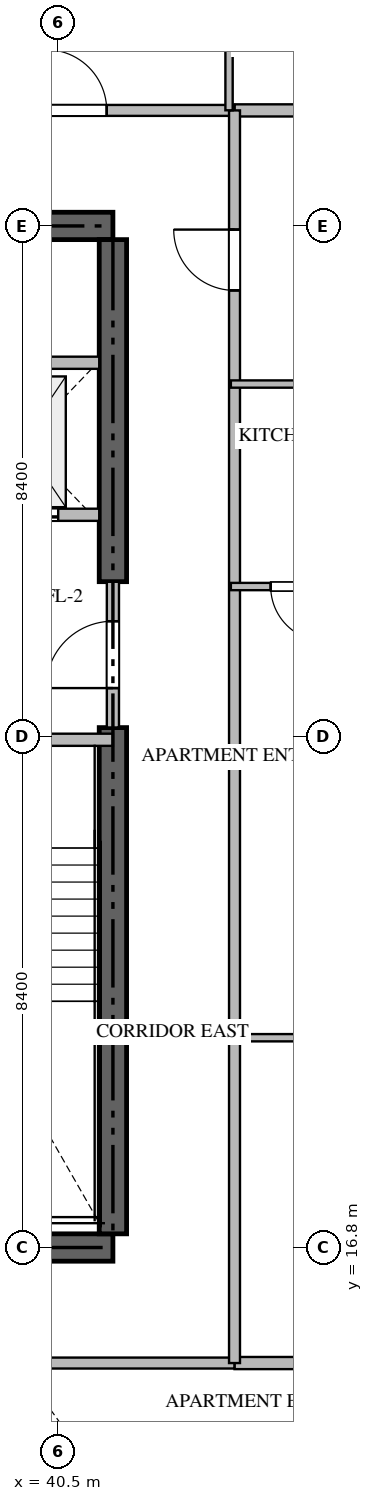
"""IFC4 building model, lengths in metres.
Left out: names, types, materials, properties, quantities, classifications, styles, units other than length and angle.
Written with IfcOpenShell. Run it as: python <this file> out.ifc"""

import sys

from ifc_helpers import new_model, si_unit, direction, frame, frame_2d, origin, place, context, subcontext, project, spatial, rectangle, extrude, source, transform, mapped, element, fill, save


model = new_model("IFC4")
c1 = context("Model", 3, precision=1e-05, world=origin(), true_north=direction((0.0, 1.0)))
c2 = subcontext(c1, "Body", "Model", "MODEL_VIEW")
j1 = project(units=[si_unit("LENGTHUNIT", "METRE"), si_unit("PLANEANGLEUNIT", "RADIAN")], contexts=[c1])
p1 = place(None, origin())
s1 = spatial("IfcSite", under=j1, at=p1, CompositionType="ELEMENT")
p2 = place(p1, origin())
s2 = spatial("IfcBuilding", under=s1, at=p2, CompositionType="ELEMENT")
p3 = place(p2, frame((0.0, 0.0, 49.2)))
s3 = spatial("IfcBuildingStorey", under=s2, at=p3, CompositionType="ELEMENT", Elevation=49.2)
for number, where, z_axis, x_axis in (
    (1, (23.4, 16.8, -0.26), (0.0, 0.0, 1.0), (1.0, 0.0, 0.0)),
    (2, (41.4, 33.6, -0.26), (0.0, 0.0, 1.0), (-1.0, 0.0, 0.0)),
):
    element("IfcWall", number, at=place(p3, frame(where, z_axis=z_axis, x_axis=x_axis)), inside=s3, PredefinedType="SHEAR", context=c2, shape_type="SweptSolid", body=[
        extrude(rectangle(XDim=18.0, YDim=0.45, at=frame_2d((9.0, 0.0))), origin(), (0.0, 0.0, 1.0), 3.748),
    ])
p4 = place(p3, frame((41.4, 17.025, -0.26), z_axis=(0.0, 0.0, 1.0), x_axis=(0.0, 1.0, 0.0)))
e3 = element("IfcWall", 3, at=p4, inside=s3, PredefinedType="SHEAR", context=c2, shape_type="SweptSolid", body=[
    extrude(rectangle(XDim=8.325, YDim=0.45, at=frame_2d((4.163, 0.0))), origin(), (0.0, 0.0, 1.0), 3.748),
])
p5 = place(p3, frame((41.4, 27.75, -0.26), z_axis=(0.0, 0.0, 1.0), x_axis=(0.0, 1.0, 0.0)))
e4 = element("IfcWall", 4, at=p5, inside=s3, PredefinedType="SHEAR", context=c2, shape_type="SweptSolid", body=[
    extrude(rectangle(XDim=5.625, YDim=0.45, at=frame_2d((2.812, 0.0))), origin(), (0.0, 0.0, 1.0), 3.748),
])
p6 = place(p3, frame((36.95, 25.15, 0.0), z_axis=(0.0, 0.0, 1.0), x_axis=(1.0, 0.0, 0.0)))
e5 = element("IfcWall", 5, at=p6, inside=s3, PredefinedType="STANDARD", context=c2, shape_type="SweptSolid", body=[
    extrude(rectangle(XDim=4.45, YDim=0.2, at=frame_2d((2.225, 0.0))), origin(), (0.0, 0.0, 1.0), 3.49),
])
p7 = place(p6, frame((1.65, 0.0, 0.0)))
e6 = element("IfcOpeningElement", 6, at=p7, cuts=e5, PredefinedType="OPENING", context=c2, shape_type="SweptSolid", body=[
    extrude(rectangle(XDim=1.1, YDim=2.15, at=frame_2d((0.55, 1.075))), frame((0.0, 0.11, 0.0), z_axis=(0.0, -1.0, 0.0), x_axis=(1.0, 0.0, 0.0)), (0.0, 0.0, 1.0), 0.22),
])
p8 = place(p3, frame((38.75, 28.85, 0.0), z_axis=(0.0, 0.0, 1.0), x_axis=(1.0, 0.0, 0.0)))
e7 = element("IfcWall", 7, at=p8, inside=s3, PredefinedType="STANDARD", context=c2, shape_type="SweptSolid", body=[
    extrude(rectangle(XDim=2.425, YDim=0.2, at=frame_2d((1.212, 0.0))), origin(), (0.0, 0.0, 1.0), 3.49),
])
p9 = place(p8, frame((0.55, 0.0, 0.0)))
e8 = element("IfcOpeningElement", 8, at=p9, cuts=e7, PredefinedType="OPENING", context=c2, shape_type="SweptSolid", body=[
    extrude(rectangle(XDim=1.2, YDim=2.2, at=frame_2d((0.6, 1.1))), frame((0.0, 0.11, 0.0), z_axis=(0.0, -1.0, 0.0), x_axis=(1.0, 0.0, 0.0)), (0.0, 0.0, 1.0), 0.22),
])
p10 = place(p3, frame((38.75, 31.35, 0.0), z_axis=(0.0, 0.0, 1.0), x_axis=(1.0, 0.0, 0.0)))
e9 = element("IfcWall", 9, at=p10, inside=s3, PredefinedType="STANDARD", context=c2, shape_type="SweptSolid", body=[
    extrude(rectangle(XDim=2.425, YDim=0.2, at=frame_2d((1.212, 0.0))), origin(), (0.0, 0.0, 1.0), 3.49),
])
p11 = place(p3, frame((41.4, 25.352, 0.0), z_axis=(0.0, 0.0, 1.0), x_axis=(0.0, 1.0, 0.0)))
e10 = element("IfcWall", 10, at=p11, inside=s3, PredefinedType="STANDARD", context=c2, shape_type="SweptSolid", body=[
    extrude(rectangle(XDim=2.396, YDim=0.2, at=frame_2d((1.198, 0.0))), origin(), (0.0, 0.0, 1.0), 3.49),
])
p12 = place(p11, frame((0.648, 0.0, 0.0)))
e11 = element("IfcOpeningElement", 11, at=p12, cuts=e10, PredefinedType="OPENING", context=c2, shape_type="SweptSolid", body=[
    extrude(rectangle(XDim=1.1, YDim=2.15, at=frame_2d((0.55, 1.075))), frame((0.0, 0.11, 0.0), z_axis=(0.0, -1.0, 0.0), x_axis=(1.0, 0.0, 0.0)), (0.0, 0.0, 1.0), 0.22),
])
for number, where, z_axis, x_axis in (
    (12, (43.4, 14.9, 0.0), (0.0, 0.0, 1.0), (1.0, 0.0, 0.0)),
    (13, (43.4, 35.5, 0.0), (0.0, 0.0, 1.0), (1.0, 0.0, 0.0)),
):
    element("IfcWall", number, at=place(p3, frame(where, z_axis=z_axis, x_axis=x_axis)), inside=s3, PredefinedType="PARTITIONING", context=c2, shape_type="SweptSolid", body=[
        extrude(rectangle(XDim=15.318, YDim=0.2, at=frame_2d((7.659, 0.0))), origin(), (0.0, 0.0, 1.0), 3.49),
    ])
p13 = place(p3, frame((21.402, 14.9, 0.0), z_axis=(0.0, 0.0, 1.0), x_axis=(1.0, 0.0, 0.0)))
e14 = element("IfcWall", 14, at=p13, inside=s3, PredefinedType="PARTITIONING", context=c2, shape_type="SweptSolid", body=[
    extrude(rectangle(XDim=21.996, YDim=0.18, at=frame_2d((10.998, 0.0))), origin(), (0.0, 0.0, 1.0), 3.49),
])
p14 = place(p13, frame((15.222, 0.0, 0.0)))
e15 = element("IfcOpeningElement", 15, at=p14, cuts=e14, PredefinedType="OPENING", context=c2, shape_type="SweptSolid", body=[
    extrude(rectangle(XDim=1.0, YDim=2.15, at=frame_2d((0.5, 1.075))), frame((0.0, 0.1, 0.0), z_axis=(0.0, -1.0, 0.0), x_axis=(1.0, 0.0, 0.0)), (0.0, 0.0, 1.0), 0.2),
])
p15 = place(p3, frame((21.402, 35.5, 0.0), z_axis=(0.0, 0.0, 1.0), x_axis=(1.0, 0.0, 0.0)))
e16 = element("IfcWall", 16, at=p15, inside=s3, PredefinedType="PARTITIONING", context=c2, shape_type="SweptSolid", body=[
    extrude(rectangle(XDim=21.996, YDim=0.18, at=frame_2d((10.998, 0.0))), origin(), (0.0, 0.0, 1.0), 3.49),
])
p16 = place(p15, frame((2.1, 0.0, 0.0)))
e17 = element("IfcOpeningElement", 17, at=p16, cuts=e16, PredefinedType="OPENING", context=c2, shape_type="SweptSolid", body=[
    extrude(rectangle(XDim=1.0, YDim=2.15, at=frame_2d((0.5, 1.075))), frame((0.0, 0.1, 0.0), z_axis=(0.0, -1.0, 0.0), x_axis=(1.0, 0.0, 0.0)), (0.0, 0.0, 1.0), 0.2),
])
p17 = place(p15, frame((14.214, 0.0, 0.0)))
e18 = element("IfcOpeningElement", 18, at=p17, cuts=e16, PredefinedType="OPENING", context=c2, shape_type="SweptSolid", body=[
    extrude(rectangle(XDim=1.0, YDim=2.15, at=frame_2d((0.5, 1.075))), frame((0.0, 0.1, 0.0), z_axis=(0.0, -1.0, 0.0), x_axis=(1.0, 0.0, 0.0)), (0.0, 0.0, 1.0), 0.2),
])
p18 = place(p15, frame((18.896, 0.0, 0.0)))
e19 = element("IfcOpeningElement", 19, at=p18, cuts=e16, PredefinedType="OPENING", context=c2, shape_type="SweptSolid", body=[
    extrude(rectangle(XDim=1.0, YDim=2.15, at=frame_2d((0.5, 1.075))), frame((0.0, 0.1, 0.0), z_axis=(0.0, -1.0, 0.0), x_axis=(1.0, 0.0, 0.0)), (0.0, 0.0, 1.0), 0.2),
])
p19 = place(p3, frame((43.4, 14.9, 0.0), z_axis=(0.0, 0.0, 1.0), x_axis=(0.0, 1.0, 0.0)))
e20 = element("IfcWall", 20, at=p19, inside=s3, PredefinedType="PARTITIONING", context=c2, shape_type="SweptSolid", body=[
    extrude(rectangle(XDim=20.6, YDim=0.18, at=frame_2d((10.3, 0.0))), origin(), (0.0, 0.0, 1.0), 3.49),
])
p20 = place(p19, frame((17.64, 0.0, 0.0)))
e21 = element("IfcOpeningElement", 21, at=p20, cuts=e20, PredefinedType="OPENING", context=c2, shape_type="SweptSolid", body=[
    extrude(rectangle(XDim=1.0, YDim=2.15, at=frame_2d((0.5, 1.075))), frame((0.0, 0.1, 0.0), z_axis=(0.0, -1.0, 0.0), x_axis=(1.0, 0.0, 0.0)), (0.0, 0.0, 1.0), 0.2),
])
p21 = place(p3, frame((43.31, 38.25, 0.0), z_axis=(0.0, 0.0, 1.0), x_axis=(0.0, -1.0, 0.0)))
e22 = element("IfcWall", 22, at=p21, inside=s3, PredefinedType="PARTITIONING", context=c2, shape_type="SweptSolid", body=[
    extrude(rectangle(XDim=2.748, YDim=0.12, at=frame_2d((1.374, 0.0))), origin(), (0.0, 0.0, 1.0), 3.49),
])
p22 = place(p3, frame((46.15, 31.0, 0.0), z_axis=(0.0, 0.0, 1.0), x_axis=(-1.0, 0.0, 0.0)))
e23 = element("IfcWall", 23, at=p22, inside=s3, PredefinedType="PARTITIONING", context=c2, shape_type="SweptSolid", body=[
    extrude(rectangle(XDim=2.81, YDim=0.12, at=frame_2d((1.405, 0.0))), origin(), (0.0, 0.0, 1.0), 3.49),
])
p23 = place(p3, frame((45.55, 27.67, 0.0), z_axis=(0.0, 0.0, 1.0), x_axis=(-1.0, 0.0, 0.0)))
e24 = element("IfcWall", 24, at=p23, inside=s3, PredefinedType="PARTITIONING", context=c2, shape_type="SweptSolid", body=[
    extrude(rectangle(XDim=2.21, YDim=0.12, at=frame_2d((1.105, 0.0))), origin(), (0.0, 0.0, 1.0), 3.49),
])
p24 = place(p23, frame((0.655, 0.0, 0.0)))
e25 = element("IfcOpeningElement", 25, at=p24, cuts=e24, PredefinedType="OPENING", context=c2, shape_type="SweptSolid", body=[
    extrude(rectangle(XDim=0.9, YDim=2.1, at=frame_2d((0.45, 1.05))), frame((0.0, 0.07, 0.0), z_axis=(0.0, -1.0, 0.0), x_axis=(1.0, 0.0, 0.0)), (0.0, 0.0, 1.0), 0.14),
])
p25 = place(p3, frame((45.548, 20.25, 0.0), z_axis=(0.0, 0.0, 1.0), x_axis=(-1.0, 0.0, 0.0)))
e26 = element("IfcWall", 26, at=p25, inside=s3, PredefinedType="PARTITIONING", context=c2, shape_type="SweptSolid", body=[
    extrude(rectangle(XDim=2.208, YDim=0.12, at=frame_2d((1.104, 0.0))), origin(), (0.0, 0.0, 1.0), 3.49),
])
m1 = source(origin(), c2, "Body", "SweptSolid", [
    extrude(rectangle(XDim=1.2, YDim=2.2, at=frame_2d((0.6, 1.1))), frame((0.0, 0.025, 0.0), z_axis=(0.0, -1.0, 0.0), x_axis=(1.0, 0.0, 0.0)), (0.0, 0.0, 1.0), 0.05),
])
p26 = place(p9, origin())
e27 = element("IfcDoor", 27, at=p26, inside=s3, OperationType="DOUBLE_DOOR_SLIDING", PredefinedType="DOOR", context=c2, shape_type="MappedRepresentation", body=[
    mapped(m1, transform((0.0, 0.0, 0.0), scale=1.0)),
])
fill(e8, e27)
m2 = source(origin(), c2, "Body", "SweptSolid", [
    extrude(rectangle(XDim=1.1, YDim=2.15, at=frame_2d((0.55, 1.075))), frame((0.0, 0.025, 0.0), z_axis=(0.0, -1.0, 0.0), x_axis=(1.0, 0.0, 0.0)), (0.0, 0.0, 1.0), 0.05),
])
p27 = place(p12, origin())
e28 = element("IfcDoor", 28, at=p27, inside=s3, OperationType="SINGLE_SWING_LEFT", PredefinedType="DOOR", context=c2, shape_type="MappedRepresentation", body=[
    mapped(m2, transform((0.0, 0.0, 0.0), scale=1.0)),
])
fill(e11, e28)
m3 = source(origin(), c2, "Body", "SweptSolid", [
    extrude(rectangle(XDim=1.0, YDim=2.15, at=frame_2d((0.5, 1.075))), frame((0.0, 0.025, 0.0), z_axis=(0.0, -1.0, 0.0), x_axis=(1.0, 0.0, 0.0)), (0.0, 0.0, 1.0), 0.05),
])
p28 = place(p18, origin())
e29 = element("IfcDoor", 29, at=p28, inside=s3, OperationType="SINGLE_SWING_LEFT", PredefinedType="DOOR", context=c2, shape_type="MappedRepresentation", body=[
    mapped(m3, transform((0.0, 0.0, 0.0), scale=1.0)),
])
fill(e19, e29)
p29 = place(p20, origin())
e30 = element("IfcDoor", 30, at=p29, inside=s3, OperationType="SINGLE_SWING_RIGHT", PredefinedType="DOOR", context=c2, shape_type="MappedRepresentation", body=[
    mapped(m3, transform((0.0, 0.0, 0.0), scale=1.0)),
])
fill(e21, e30)
m4 = source(origin(), c2, "Body", "SweptSolid", [
    extrude(rectangle(XDim=0.9, YDim=2.1, at=frame_2d((0.45, 1.05))), frame((0.0, 0.025, 0.0), z_axis=(0.0, -1.0, 0.0), x_axis=(1.0, 0.0, 0.0)), (0.0, 0.0, 1.0), 0.05),
])
p30 = place(p24, origin())
e31 = element("IfcDoor", 31, at=p30, inside=s3, OperationType="SINGLE_SWING_LEFT", PredefinedType="DOOR", context=c2, shape_type="MappedRepresentation", body=[
    mapped(m4, transform((0.0, 0.0, 0.0), scale=1.0)),
])
fill(e25, e31)
save(model, sys.argv[1])
